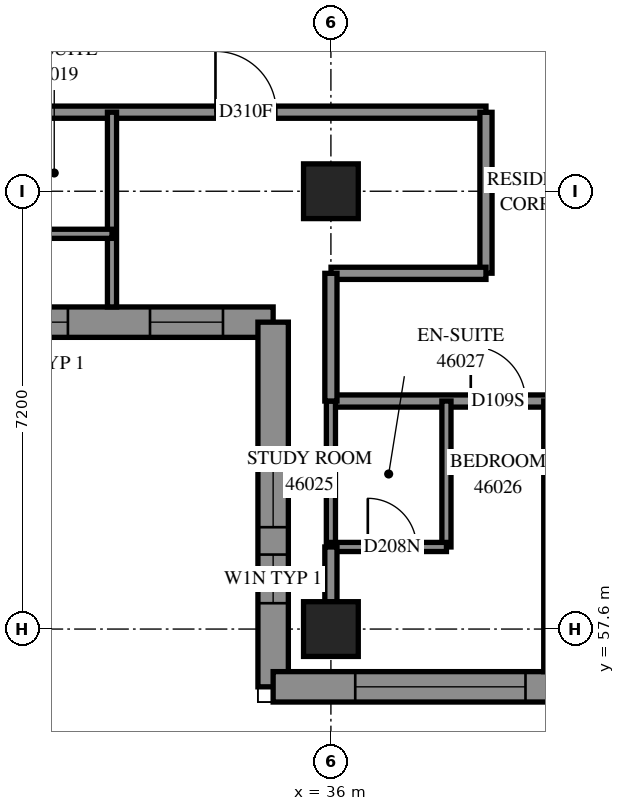
"""IFC4 building model, lengths in metres.
Left out: names, types, materials, properties, quantities, classifications, styles, units other than length and angle.
Written with IfcOpenShell. Run it as: python <this file> out.ifc"""

import sys

from ifc_helpers import new_model, si_unit, direction, frame, frame_2d, origin, origin_2d, place, context, subcontext, project, spatial, polyline, rectangle, outline, extrude, element, fill, save


model = new_model("IFC4")
c1 = context("Model", 3, precision=1e-05, world=origin(), true_north=direction((0.0, 1.0)))
c2 = subcontext(c1, "Body", "Model", "MODEL_VIEW")
j1 = project(units=[si_unit("LENGTHUNIT", "METRE"), si_unit("PLANEANGLEUNIT", "RADIAN")], contexts=[c1])
p1 = place(None, origin())
s1 = spatial("IfcSite", under=j1, at=p1, CompositionType="ELEMENT")
p2 = place(p1, origin())
s2 = spatial("IfcBuilding", under=s1, at=p2, CompositionType="ELEMENT")
p3 = place(p2, frame((0.0, 0.0, 169.4)))
s3 = spatial("IfcBuildingStorey", under=s2, at=p3, CompositionType="ELEMENT", Elevation=169.4)
for number, where, z_axis, x_axis in (
    (1, (36.0, 57.6, 0.0), (0.0, 0.0, 1.0), (1.0, 0.0, 0.0)),
    (2, (36.0, 64.8, 0.0), (0.0, 0.0, 1.0), (1.0, 0.0, 0.0)),
):
    element("IfcColumn", number, at=place(p3, frame(where, z_axis=z_axis, x_axis=x_axis)), inside=s3, PredefinedType="COLUMN", context=c2, shape_type="SweptSolid", body=[
        extrude(rectangle(XDim=0.9, YDim=0.9, at=origin_2d()), origin(), (0.0, 0.0, 1.0), 3.1),
    ])
p4 = place(p3, frame((19.447, 62.647, 0.0), z_axis=(0.0, 0.0, 1.0), x_axis=(1.0, 0.0, 0.0)))
e3 = element("IfcWall", 3, at=p4, inside=s3, PredefinedType="SOLIDWALL", context=c2, shape_type="SweptSolid", body=[
    extrude(outline(polyline([(-0.25, -0.25), (15.353, -0.25), (15.853, 0.25), (0.25, 0.25), (-0.25, -0.25)])), origin(), (0.0, 0.0, 1.0), 3.1),
])
p5 = place(p4, frame((2.553, 0.0, 0.45)))
e4 = element("IfcOpeningElement", 4, at=p5, cuts=e3, PredefinedType="OPENING", context=c2, shape_type="SweptSolid", body=[
    extrude(rectangle(XDim=2.8, YDim=2.5, at=frame_2d((1.4, 1.25))), frame((0.0, 0.26, 0.0), z_axis=(0.0, -1.0, 0.0), x_axis=(1.0, 0.0, 0.0)), (0.0, 0.0, 1.0), 0.52),
])
p6 = place(p4, frame((6.153, 0.0, 0.45)))
e5 = element("IfcOpeningElement", 5, at=p6, cuts=e3, PredefinedType="OPENING", context=c2, shape_type="SweptSolid", body=[
    extrude(rectangle(XDim=2.8, YDim=2.5, at=frame_2d((1.4, 1.25))), frame((0.0, 0.26, 0.0), z_axis=(0.0, -1.0, 0.0), x_axis=(1.0, 0.0, 0.0)), (0.0, 0.0, 1.0), 0.52),
])
p7 = place(p4, frame((0.702, 0.0, 0.45)))
e6 = element("IfcOpeningElement", 6, at=p7, cuts=e3, PredefinedType="OPENING", context=c2, shape_type="SweptSolid", body=[
    extrude(rectangle(XDim=1.2, YDim=2.5, at=frame_2d((0.6, 1.25))), frame((0.0, 0.26, 0.0), z_axis=(0.0, -1.0, 0.0), x_axis=(1.0, 0.0, 0.0)), (0.0, 0.0, 1.0), 0.52),
])
p8 = place(p4, frame((13.578, 0.0, 0.45)))
e7 = element("IfcOpeningElement", 7, at=p8, cuts=e3, PredefinedType="OPENING", context=c2, shape_type="SweptSolid", body=[
    extrude(rectangle(XDim=1.2, YDim=2.5, at=frame_2d((0.6, 1.25))), frame((0.0, 0.26, 0.0), z_axis=(0.0, -1.0, 0.0), x_axis=(1.0, 0.0, 0.0)), (0.0, 0.0, 1.0), 0.52),
])
p9 = place(p4, frame((9.578, 0.0, 0.45)))
e8 = element("IfcOpeningElement", 8, at=p9, cuts=e3, PredefinedType="OPENING", context=c2, shape_type="SweptSolid", body=[
    extrude(rectangle(XDim=1.3, YDim=2.5, at=frame_2d((0.65, 1.25))), frame((0.0, 0.26, 0.0), z_axis=(0.0, -1.0, 0.0), x_axis=(1.0, 0.0, 0.0)), (0.0, 0.0, 1.0), 0.52),
])
p10 = place(p4, frame((11.228, 0.0, 0.45)))
e9 = element("IfcOpeningElement", 9, at=p10, cuts=e3, PredefinedType="OPENING", context=c2, shape_type="SweptSolid", body=[
    extrude(rectangle(XDim=1.0, YDim=2.5, at=frame_2d((0.5, 1.25))), frame((0.0, 0.26, 0.0), z_axis=(0.0, -1.0, 0.0), x_axis=(1.0, 0.0, 0.0)), (0.0, 0.0, 1.0), 0.52),
])
p11 = place(p3, frame((35.05, 62.647, 0.0), z_axis=(0.0, 0.0, 1.0), x_axis=(0.0, -1.0, 0.0)))
e10 = element("IfcWall", 10, at=p11, inside=s3, PredefinedType="SOLIDWALL", context=c2, shape_type="SweptSolid", body=[
    extrude(outline(polyline([(0.25, -0.25), (6.247, -0.25), (5.747, 0.25), (-0.25, 0.25), (0.25, -0.25)])), origin(), (0.0, 0.0, 1.0), 3.1),
])
p12 = place(p11, frame((2.072, 0.0, 0.45)))
e11 = element("IfcOpeningElement", 11, at=p12, cuts=e10, PredefinedType="OPENING", context=c2, shape_type="SweptSolid", body=[
    extrude(rectangle(XDim=1.3, YDim=2.5, at=frame_2d((0.65, 1.25))), frame((0.0, 0.26, 0.0), z_axis=(0.0, -1.0, 0.0), x_axis=(1.0, 0.0, 0.0)), (0.0, 0.0, 1.0), 0.52),
])
p13 = place(p11, frame((3.822, 0.0, 0.45)))
e12 = element("IfcOpeningElement", 12, at=p13, cuts=e10, PredefinedType="OPENING", context=c2, shape_type="SweptSolid", body=[
    extrude(rectangle(XDim=0.8, YDim=2.5, at=frame_2d((0.4, 1.25))), frame((0.0, 0.26, 0.0), z_axis=(0.0, -1.0, 0.0), x_axis=(1.0, 0.0, 0.0)), (0.0, 0.0, 1.0), 0.52),
])
p14 = place(p3, frame((35.05, 56.65, 0.0), z_axis=(0.0, 0.0, 1.0), x_axis=(1.0, 0.0, 0.0)))
e13 = element("IfcWall", 13, at=p14, inside=s3, PredefinedType="SOLIDWALL", context=c2, shape_type="SweptSolid", body=[
    extrude(outline(polyline([(-0.25, -0.25), (6.95, -0.25), (7.45, 0.25), (0.25, 0.25), (-0.25, -0.25)])), origin(), (0.0, 0.0, 1.0), 3.1),
])
p15 = place(p14, frame((1.35, 0.0, 0.45)))
e14 = element("IfcOpeningElement", 14, at=p15, cuts=e13, PredefinedType="OPENING", context=c2, shape_type="SweptSolid", body=[
    extrude(rectangle(XDim=2.8, YDim=2.5, at=frame_2d((1.4, 1.25))), frame((0.0, 0.26, 0.0), z_axis=(0.0, -1.0, 0.0), x_axis=(1.0, 0.0, 0.0)), (0.0, 0.0, 1.0), 0.52),
])
p16 = place(p14, frame((5.175, 0.0, 0.45)))
e15 = element("IfcOpeningElement", 15, at=p16, cuts=e13, PredefinedType="OPENING", context=c2, shape_type="SweptSolid", body=[
    extrude(rectangle(XDim=1.2, YDim=2.5, at=frame_2d((0.6, 1.25))), frame((0.0, 0.26, 0.0), z_axis=(0.0, -1.0, 0.0), x_axis=(1.0, 0.0, 0.0)), (0.0, 0.0, 1.0), 0.52),
])
p17 = place(p3, frame((36.0, 61.35, 0.0), z_axis=(0.0, 0.0, 1.0), x_axis=(1.0, 0.0, 0.0)))
e16 = element("IfcWall", 16, at=p17, inside=s3, PredefinedType="PARTITIONING", context=c2, shape_type="SweptSolid", body=[
    extrude(rectangle(XDim=16.95, YDim=0.2, at=frame_2d((8.475, 0.0))), origin(), (0.0, 0.0, 1.0), 3.1),
])
p18 = place(p17, frame((2.3, 0.0, 0.0)))
e17 = element("IfcOpeningElement", 17, at=p18, cuts=e16, PredefinedType="OPENING", context=c2, shape_type="SweptSolid", body=[
    extrude(rectangle(XDim=0.9, YDim=2.1, at=frame_2d((0.45, 1.05))), frame((0.0, 0.11, 0.0), z_axis=(0.0, -1.0, 0.0), x_axis=(1.0, 0.0, 0.0)), (0.0, 0.0, 1.0), 0.22),
])
p19 = place(p17, frame((4.125, 0.0, 0.0)))
e18 = element("IfcOpeningElement", 18, at=p19, cuts=e16, PredefinedType="OPENING", context=c2, shape_type="SweptSolid", body=[
    extrude(rectangle(XDim=1.0, YDim=2.1, at=frame_2d((0.5, 1.05))), frame((0.0, 0.11, 0.0), z_axis=(0.0, -1.0, 0.0), x_axis=(1.0, 0.0, 0.0)), (0.0, 0.0, 1.0), 0.22),
])
p20 = place(p17, frame((9.5, 0.0, 0.0)))
e19 = element("IfcOpeningElement", 19, at=p20, cuts=e16, PredefinedType="OPENING", context=c2, shape_type="SweptSolid", body=[
    extrude(rectangle(XDim=0.9, YDim=2.1, at=frame_2d((0.45, 1.05))), frame((0.0, 0.11, 0.0), z_axis=(0.0, -1.0, 0.0), x_axis=(1.0, 0.0, 0.0)), (0.0, 0.0, 1.0), 0.22),
])
p21 = place(p17, frame((11.635, 0.0, 0.0)))
e20 = element("IfcOpeningElement", 20, at=p21, cuts=e16, PredefinedType="OPENING", context=c2, shape_type="SweptSolid", body=[
    extrude(rectangle(XDim=1.0, YDim=2.1, at=frame_2d((0.5, 1.05))), frame((0.0, 0.11, 0.0), z_axis=(0.0, -1.0, 0.0), x_axis=(1.0, 0.0, 0.0)), (0.0, 0.0, 1.0), 0.22),
])
p22 = place(p17, frame((15.803, 0.0, 0.0)))
e21 = element("IfcOpeningElement", 21, at=p22, cuts=e16, PredefinedType="OPENING", context=c2, shape_type="SweptSolid", body=[
    extrude(rectangle(XDim=1.0, YDim=2.1, at=frame_2d((0.5, 1.05))), frame((0.0, 0.11, 0.0), z_axis=(0.0, -1.0, 0.0), x_axis=(1.0, 0.0, 0.0)), (0.0, 0.0, 1.0), 0.22),
])
p23 = place(p3, frame((21.6, 66.1, 0.0), z_axis=(0.0, 0.0, 1.0), x_axis=(1.0, 0.0, 0.0)))
e22 = element("IfcWall", 22, at=p23, inside=s3, PredefinedType="PARTITIONING", context=c2, shape_type="SweptSolid", body=[
    extrude(rectangle(XDim=16.95, YDim=0.2, at=frame_2d((8.475, 0.0))), origin(), (0.0, 0.0, 1.0), 3.1),
])
p24 = place(p23, frame((0.546, 0.0, 0.0)))
e23 = element("IfcOpeningElement", 23, at=p24, cuts=e22, PredefinedType="OPENING", context=c2, shape_type="SweptSolid", body=[
    extrude(rectangle(XDim=0.9, YDim=2.1, at=frame_2d((0.45, 1.05))), frame((0.0, 0.11, 0.0), z_axis=(0.0, -1.0, 0.0), x_axis=(1.0, 0.0, 0.0)), (0.0, 0.0, 1.0), 0.22),
])
p25 = place(p23, frame((12.502, 0.0, 0.0)))
e24 = element("IfcOpeningElement", 24, at=p25, cuts=e22, PredefinedType="OPENING", context=c2, shape_type="SweptSolid", body=[
    extrude(rectangle(XDim=1.0, YDim=2.1, at=frame_2d((0.5, 1.05))), frame((0.0, 0.11, 0.0), z_axis=(0.0, -1.0, 0.0), x_axis=(1.0, 0.0, 0.0)), (0.0, 0.0, 1.0), 0.22),
])
p26 = place(p3, frame((39.6, 56.9, 0.0), z_axis=(0.0, 0.0, 1.0), x_axis=(0.0, 1.0, 0.0)))
e25 = element("IfcWall", 25, at=p26, inside=s3, PredefinedType="PARTITIONING", context=c2, shape_type="SweptSolid", body=[
    extrude(rectangle(XDim=4.45, YDim=0.2, at=frame_2d((2.225, 0.0))), origin(), (0.0, 0.0, 1.0), 3.1),
])
p27 = place(p3, frame((32.4, 62.897, 0.0), z_axis=(0.0, 0.0, 1.0), x_axis=(0.0, 1.0, 0.0)))
e26 = element("IfcWall", 26, at=p27, inside=s3, PredefinedType="PARTITIONING", context=c2, shape_type="SweptSolid", body=[
    extrude(rectangle(XDim=3.203, YDim=0.15, at=frame_2d((1.601, 0.0))), origin(), (0.0, 0.0, 1.0), 3.1),
])
p28 = place(p3, frame((38.55, 63.452, 0.0), z_axis=(0.0, 0.0, 1.0), x_axis=(0.0, 1.0, 0.0)))
e27 = element("IfcWall", 27, at=p28, inside=s3, PredefinedType="PARTITIONING", context=c2, shape_type="SweptSolid", body=[
    extrude(rectangle(XDim=2.646, YDim=0.2, at=frame_2d((1.323, 0.0))), origin(), (0.0, 0.0, 1.0), 3.1),
])
p29 = place(p3, frame((36.002, 63.45, 0.0), z_axis=(0.0, 0.0, 1.0), x_axis=(1.0, 0.0, 0.0)))
e28 = element("IfcWall", 28, at=p29, inside=s3, PredefinedType="PARTITIONING", context=c2, shape_type="SweptSolid", body=[
    extrude(rectangle(XDim=2.548, YDim=0.2, at=frame_2d((1.274, 0.0))), origin(), (0.0, 0.0, 1.0), 3.1),
])
p30 = place(p3, frame((37.9, 58.95, 0.0), z_axis=(0.0, 0.0, 1.0), x_axis=(0.0, 1.0, 0.0)))
e29 = element("IfcWall", 29, at=p30, inside=s3, PredefinedType="PARTITIONING", context=c2, shape_type="SweptSolid", body=[
    extrude(rectangle(XDim=2.4, YDim=0.15, at=frame_2d((1.2, 0.0))), origin(), (0.0, 0.0, 1.0), 3.1),
])
p31 = place(p3, frame((36.0, 58.95, 0.0), z_axis=(0.0, 0.0, 1.0), x_axis=(0.0, 1.0, 0.0)))
e30 = element("IfcWall", 30, at=p31, inside=s3, PredefinedType="PARTITIONING", context=c2, shape_type="SweptSolid", body=[
    extrude(rectangle(XDim=2.4, YDim=0.15, at=frame_2d((1.2, 0.0))), origin(), (0.0, 0.0, 1.0), 2.6),
])
p32 = place(p3, frame((36.0, 61.35, 0.0), z_axis=(0.0, 0.0, 1.0), x_axis=(0.0, 1.0, 0.0)))
e31 = element("IfcWall", 31, at=p32, inside=s3, PredefinedType="PARTITIONING", context=c2, shape_type="SweptSolid", body=[
    extrude(rectangle(XDim=2.1, YDim=0.2, at=frame_2d((1.05, 0.0))), origin(), (0.0, 0.0, 1.0), 2.6),
])
p33 = place(p3, frame((30.5, 64.1, 0.0), z_axis=(0.0, 0.0, 1.0), x_axis=(1.0, 0.0, 0.0)))
e32 = element("IfcWall", 32, at=p33, inside=s3, PredefinedType="PARTITIONING", context=c2, shape_type="SweptSolid", body=[
    extrude(rectangle(XDim=1.9, YDim=0.15, at=frame_2d((0.95, 0.0))), origin(), (0.0, 0.0, 1.0), 3.1),
])
p34 = place(p3, frame((36.0, 58.95, 0.0), z_axis=(0.0, 0.0, 1.0), x_axis=(1.0, 0.0, 0.0)))
e33 = element("IfcWall", 33, at=p34, inside=s3, PredefinedType="PARTITIONING", context=c2, shape_type="SweptSolid", body=[
    extrude(rectangle(XDim=1.9, YDim=0.15, at=frame_2d((0.95, 0.0))), origin(), (0.0, 0.0, 1.0), 3.1),
])
p35 = place(p34, frame((0.607, 0.0, 0.0)))
e34 = element("IfcOpeningElement", 34, at=p35, cuts=e33, PredefinedType="OPENING", context=c2, shape_type="SweptSolid", body=[
    extrude(rectangle(XDim=0.8, YDim=2.1, at=frame_2d((0.4, 1.05))), frame((0.0, 0.085, 0.0), z_axis=(0.0, -1.0, 0.0), x_axis=(1.0, 0.0, 0.0)), (0.0, 0.0, 1.0), 0.17),
])
p36 = place(p3, frame((36.0, 58.05, 0.0), z_axis=(0.0, 0.0, 1.0), x_axis=(0.0, 1.0, 0.0)))
e35 = element("IfcWall", 35, at=p36, inside=s3, PredefinedType="PARTITIONING", context=c2, shape_type="SweptSolid", body=[
    extrude(rectangle(XDim=0.9, YDim=0.2, at=frame_2d((0.45, 0.0))), origin(), (0.0, 0.0, 1.0), 2.6),
])
p37 = place(p8, origin())
e36 = element("IfcWindow", 36, at=p37, inside=s3, PartitioningType="SINGLE_PANEL", PredefinedType="WINDOW", context=c2, shape_type="SweptSolid", body=[
    extrude(rectangle(XDim=1.2, YDim=2.5, at=frame_2d((0.6, 1.25))), frame((0.0, 0.18, 0.0), z_axis=(0.0, -1.0, 0.0), x_axis=(1.0, 0.0, 0.0)), (0.0, 0.0, 1.0), 0.06),
])
fill(e7, e36)
p38 = place(p15, origin())
e37 = element("IfcWindow", 37, at=p38, inside=s3, PartitioningType="SINGLE_PANEL", PredefinedType="WINDOW", context=c2, shape_type="SweptSolid", body=[
    extrude(rectangle(XDim=2.8, YDim=2.5, at=frame_2d((1.4, 1.25))), frame((0.0, 0.18, 0.0), z_axis=(0.0, -1.0, 0.0), x_axis=(1.0, 0.0, 0.0)), (0.0, 0.0, 1.0), 0.06),
])
fill(e14, e37)
p39 = place(p25, origin())
e38 = element("IfcDoor", 38, at=p39, inside=s3, OperationType="SINGLE_SWING_RIGHT", PredefinedType="DOOR", context=c2, shape_type="SweptSolid", body=[
    extrude(rectangle(XDim=1.0, YDim=2.1, at=frame_2d((0.5, 1.05))), frame((0.0, 0.025, 0.0), z_axis=(0.0, -1.0, 0.0), x_axis=(1.0, 0.0, 0.0)), (0.0, 0.0, 1.0), 0.05),
])
fill(e24, e38)
p40 = place(p18, origin())
e39 = element("IfcDoor", 39, at=p40, inside=s3, OperationType="SINGLE_SWING_LEFT", PredefinedType="DOOR", context=c2, shape_type="SweptSolid", body=[
    extrude(rectangle(XDim=0.9, YDim=2.1, at=frame_2d((0.45, 1.05))), frame((0.0, 0.025, 0.0), z_axis=(0.0, -1.0, 0.0), x_axis=(1.0, 0.0, 0.0)), (0.0, 0.0, 1.0), 0.05),
])
fill(e17, e39)
p41 = place(p35, origin())
e40 = element("IfcDoor", 40, at=p41, inside=s3, OperationType="SINGLE_SWING_RIGHT", PredefinedType="DOOR", context=c2, shape_type="SweptSolid", body=[
    extrude(rectangle(XDim=0.8, YDim=2.1, at=frame_2d((0.4, 1.05))), frame((0.0, 0.025, 0.0), z_axis=(0.0, -1.0, 0.0), x_axis=(1.0, 0.0, 0.0)), (0.0, 0.0, 1.0), 0.05),
])
fill(e34, e40)
p42 = place(p10, origin())
e41 = element("IfcWindow", 41, at=p42, inside=s3, PartitioningType="SINGLE_PANEL", PredefinedType="WINDOW", context=c2, shape_type="SweptSolid", body=[
    extrude(rectangle(XDim=1.0, YDim=2.5, at=frame_2d((0.5, 1.25))), frame((0.0, 0.18, 0.0), z_axis=(0.0, -1.0, 0.0), x_axis=(1.0, 0.0, 0.0)), (0.0, 0.0, 1.0), 0.06),
])
fill(e9, e41)
p43 = place(p12, origin())
e42 = element("IfcWindow", 42, at=p43, inside=s3, PartitioningType="SINGLE_PANEL", PredefinedType="WINDOW", context=c2, shape_type="SweptSolid", body=[
    extrude(rectangle(XDim=1.3, YDim=2.5, at=frame_2d((0.65, 1.25))), frame((0.0, 0.18, 0.0), z_axis=(0.0, -1.0, 0.0), x_axis=(1.0, 0.0, 0.0)), (0.0, 0.0, 1.0), 0.06),
])
fill(e11, e42)
p44 = place(p13, origin())
e43 = element("IfcWindow", 43, at=p44, inside=s3, PartitioningType="SINGLE_PANEL", PredefinedType="WINDOW", context=c2, shape_type="SweptSolid", body=[
    extrude(rectangle(XDim=0.8, YDim=2.5, at=frame_2d((0.4, 1.25))), frame((0.0, 0.18, 0.0), z_axis=(0.0, -1.0, 0.0), x_axis=(1.0, 0.0, 0.0)), (0.0, 0.0, 1.0), 0.06),
])
fill(e12, e43)
save(model, sys.argv[1])
